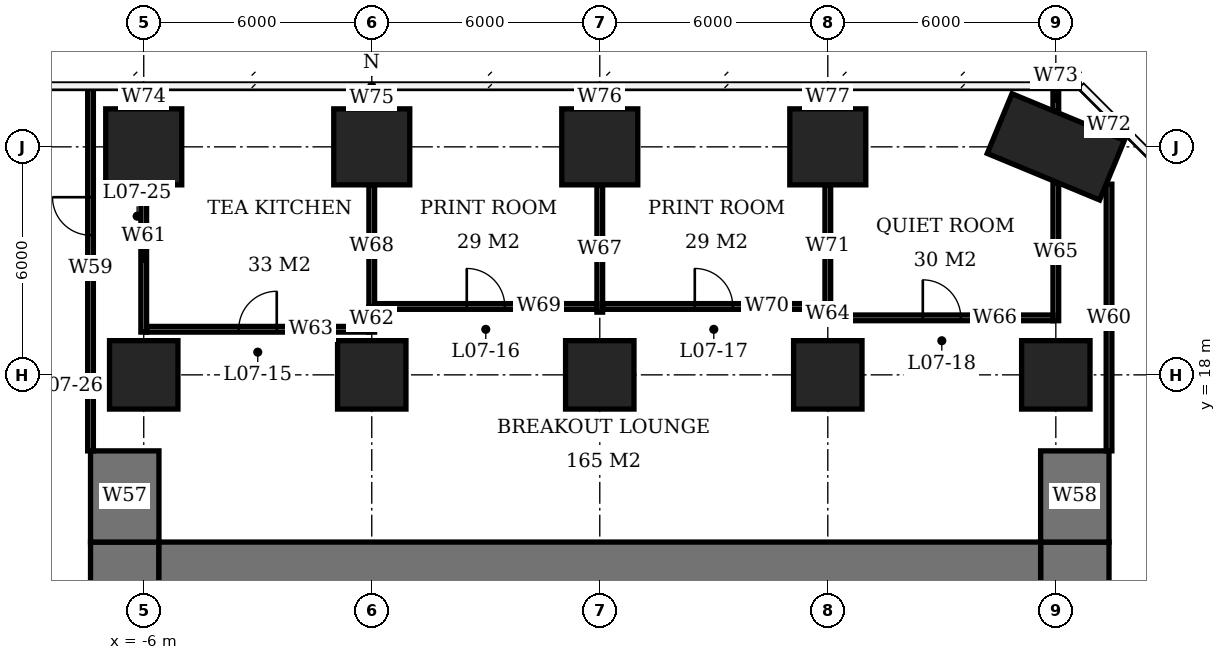
"""IFC4 building model, lengths in metres.
Left out: names, types, materials, properties, quantities, classifications, styles, units other than length and angle.
Written with IfcOpenShell. Run it as: python <this file> out.ifc"""

import sys

from ifc_helpers import new_model, si_unit, direction, frame, frame_2d, origin, origin_2d, place, context, subcontext, project, spatial, rectangle, extrude, element, fill, save


model = new_model("IFC4")
c1 = context("Model", 3, precision=1e-05, world=origin(), true_north=direction((0.0, 1.0)))
c2 = subcontext(c1, "Body", "Model", "MODEL_VIEW")
j1 = project(units=[si_unit("LENGTHUNIT", "METRE"), si_unit("PLANEANGLEUNIT", "RADIAN")], contexts=[c1])
p1 = place(None, origin())
s1 = spatial("IfcSite", under=j1, at=p1, CompositionType="ELEMENT")
p2 = place(p1, origin())
s2 = spatial("IfcBuilding", under=s1, at=p2, CompositionType="ELEMENT")
p3 = place(p2, frame((0.0, 0.0, 33.8)))
s3 = spatial("IfcBuildingStorey", under=s2, at=p3, CompositionType="ELEMENT", Elevation=33.8)
p4 = place(p3, frame((-6.0, 18.0, 0.0), z_axis=(0.0, 0.0, 1.0), x_axis=(1.0, 0.0, 0.0)))
e1 = element("IfcColumn", 1, at=p4, inside=s3, PredefinedType="COLUMN", context=c2, shape_type="SweptSolid", body=[
    extrude(rectangle(XDim=1.8, YDim=1.8, at=origin_2d()), origin(), (0.0, 0.0, 1.0), 3.9),
])
p5 = place(p3, frame((-6.0, 24.0, 0.0), z_axis=(0.0, 0.0, 1.0), x_axis=(1.0, 0.0, 0.0)))
e2 = element("IfcColumn", 2, at=p5, inside=s3, PredefinedType="COLUMN", context=c2, shape_type="SweptSolid", body=[
    extrude(rectangle(XDim=2.0, YDim=2.0, at=origin_2d()), origin(), (0.0, 0.0, 1.0), 3.9),
])
p6 = place(p3, frame((0.0, 18.0, 0.0), z_axis=(0.0, 0.0, 1.0), x_axis=(1.0, 0.0, 0.0)))
e3 = element("IfcColumn", 3, at=p6, inside=s3, PredefinedType="COLUMN", context=c2, shape_type="SweptSolid", body=[
    extrude(rectangle(XDim=1.8, YDim=1.8, at=origin_2d()), origin(), (0.0, 0.0, 1.0), 3.9),
])
p7 = place(p3, frame((0.0, 24.0, 0.0), z_axis=(0.0, 0.0, 1.0), x_axis=(1.0, 0.0, 0.0)))
e4 = element("IfcColumn", 4, at=p7, inside=s3, PredefinedType="COLUMN", context=c2, shape_type="SweptSolid", body=[
    extrude(rectangle(XDim=2.0, YDim=2.0, at=origin_2d()), origin(), (0.0, 0.0, 1.0), 3.9),
])
p8 = place(p3, frame((6.0, 18.0, 0.0), z_axis=(0.0, 0.0, 1.0), x_axis=(1.0, 0.0, 0.0)))
e5 = element("IfcColumn", 5, at=p8, inside=s3, PredefinedType="COLUMN", context=c2, shape_type="SweptSolid", body=[
    extrude(rectangle(XDim=1.8, YDim=1.8, at=origin_2d()), origin(), (0.0, 0.0, 1.0), 3.9),
])
p9 = place(p3, frame((6.0, 24.0, 0.0), z_axis=(0.0, 0.0, 1.0), x_axis=(1.0, 0.0, 0.0)))
e6 = element("IfcColumn", 6, at=p9, inside=s3, PredefinedType="COLUMN", context=c2, shape_type="SweptSolid", body=[
    extrude(rectangle(XDim=2.0, YDim=2.0, at=origin_2d()), origin(), (0.0, 0.0, 1.0), 3.9),
])
p10 = place(p3, frame((12.0, 18.0, 0.0), z_axis=(0.0, 0.0, 1.0), x_axis=(1.0, 0.0, 0.0)))
e7 = element("IfcColumn", 7, at=p10, inside=s3, PredefinedType="COLUMN", context=c2, shape_type="SweptSolid", body=[
    extrude(rectangle(XDim=1.8, YDim=1.8, at=origin_2d()), origin(), (0.0, 0.0, 1.0), 3.9),
])
p11 = place(p3, frame((12.0, 24.0, 0.0), z_axis=(0.0, 0.0, 1.0), x_axis=(1.0, 0.0, 0.0)))
e8 = element("IfcColumn", 8, at=p11, inside=s3, PredefinedType="COLUMN", context=c2, shape_type="SweptSolid", body=[
    extrude(rectangle(XDim=2.0, YDim=2.0, at=origin_2d()), origin(), (0.0, 0.0, 1.0), 3.9),
])
p12 = place(p3, frame((18.0, 18.0, 0.0), z_axis=(0.0, 0.0, 1.0), x_axis=(1.0, 0.0, 0.0)))
e9 = element("IfcColumn", 9, at=p12, inside=s3, PredefinedType="COLUMN", context=c2, shape_type="SweptSolid", body=[
    extrude(rectangle(XDim=1.8, YDim=1.8, at=origin_2d()), origin(), (0.0, 0.0, 1.0), 3.9),
])
p13 = place(p3, frame((18.0, 24.0, 0.0), z_axis=(0.0, 0.0, 1.0), x_axis=(0.923879532511, -0.382683432365, 0.0)))
e10 = element("IfcColumn", 10, at=p13, inside=s3, PredefinedType="COLUMN", context=c2, shape_type="SweptSolid", body=[
    extrude(rectangle(XDim=3.2, YDim=1.7, at=origin_2d()), origin(), (0.0, 0.0, 1.0), 3.9),
])
p14 = place(p3, frame((-5.6, 12.6, 0.0), z_axis=(0.0, 0.0, 1.0), x_axis=(1.0, 0.0, 0.0)))
e11 = element("IfcWall", 11, at=p14, inside=s3, PredefinedType="SHEAR", context=c2, shape_type="SweptSolid", body=[
    extrude(rectangle(XDim=23.2, YDim=2.0, at=frame_2d((11.6, 0.0))), origin(), (0.0, 0.0, 1.0), 3.9),
])
p15 = place(p3, frame((-6.5, -7.6, 0.0), z_axis=(0.0, 0.0, 1.0), x_axis=(0.0, 1.0, 0.0)))
e12 = element("IfcWall", 12, at=p15, inside=s3, PredefinedType="SHEAR", context=c2, shape_type="SweptSolid", body=[
    extrude(rectangle(XDim=21.2, YDim=1.8, at=frame_2d((10.6, 0.0))), origin(), (0.0, 0.0, 1.0), 3.9),
])
p16 = place(p15, frame((7.8, 0.0, 0.0)))
e13 = element("IfcOpeningElement", 13, at=p16, cuts=e12, PredefinedType="OPENING", context=c2, shape_type="SweptSolid", body=[
    extrude(rectangle(XDim=1.8, YDim=2.4, at=frame_2d((0.9, 1.2))), frame((0.0, 0.91, 0.0), z_axis=(0.0, -1.0, 0.0), x_axis=(1.0, 0.0, 0.0)), (0.0, 0.0, 1.0), 1.82),
])
p17 = place(p3, frame((18.5, -7.6, 0.0), z_axis=(0.0, 0.0, 1.0), x_axis=(0.0, 1.0, 0.0)))
e14 = element("IfcWall", 14, at=p17, inside=s3, PredefinedType="SHEAR", context=c2, shape_type="SweptSolid", body=[
    extrude(rectangle(XDim=21.2, YDim=1.8, at=frame_2d((10.6, 0.0))), origin(), (0.0, 0.0, 1.0), 3.9),
])
p18 = place(p17, frame((9.2, 0.0, 0.0)))
e15 = element("IfcOpeningElement", 15, at=p18, cuts=e14, PredefinedType="OPENING", context=c2, shape_type="SweptSolid", body=[
    extrude(rectangle(XDim=1.8, YDim=2.4, at=frame_2d((0.9, 1.2))), frame((0.0, 0.91, 0.0), z_axis=(0.0, -1.0, 0.0), x_axis=(1.0, 0.0, 0.0)), (0.0, 0.0, 1.0), 1.82),
])
for number, where, z_axis, x_axis in (
    (16, (-6.5, 13.6, 0.0), (0.0, 0.0, 1.0), (0.0, 1.0, 0.0)),
    (17, (18.5, 13.6, 0.0), (0.0, 0.0, 1.0), (0.0, 1.0, 0.0)),
):
    element("IfcWall", number, at=place(p3, frame(where, z_axis=z_axis, x_axis=x_axis)), inside=s3, PredefinedType="SHEAR", context=c2, shape_type="SweptSolid", body=[
        extrude(rectangle(XDim=2.4, YDim=1.8, at=frame_2d((1.2, 0.0))), origin(), (0.0, 0.0, 1.0), 3.9),
    ])
p19 = place(p3, frame((-5.925, 19.2, 0.0), z_axis=(0.0, 0.0, 1.0), x_axis=(1.0, 0.0, 0.0)))
e18 = element("IfcWall", 18, at=p19, inside=s3, PredefinedType="PARTITIONING", context=c2, shape_type="SweptSolid", body=[
    extrude(rectangle(XDim=5.85, YDim=0.15, at=frame_2d((2.925, 0.0))), origin(), (0.0, 0.0, 1.0), 3.65),
])
p20 = place(p19, frame((2.425, 0.0, 0.0)))
e19 = element("IfcOpeningElement", 19, at=p20, cuts=e18, PredefinedType="OPENING", context=c2, shape_type="SweptSolid", body=[
    extrude(rectangle(XDim=1.0, YDim=2.1, at=frame_2d((0.5, 1.05))), frame((0.0, 0.085, 0.0), z_axis=(0.0, -1.0, 0.0), x_axis=(1.0, 0.0, 0.0)), (0.0, 0.0, 1.0), 0.17),
])
p21 = place(p3, frame((12.075, 19.5, 0.0), z_axis=(0.0, 0.0, 1.0), x_axis=(1.0, 0.0, 0.0)))
e20 = element("IfcWall", 20, at=p21, inside=s3, PredefinedType="PARTITIONING", context=c2, shape_type="SweptSolid", body=[
    extrude(rectangle(XDim=5.85, YDim=0.15, at=frame_2d((2.925, 0.0))), origin(), (0.0, 0.0, 1.0), 3.65),
])
p22 = place(p21, frame((2.425, 0.0, 0.0)))
e21 = element("IfcOpeningElement", 21, at=p22, cuts=e20, PredefinedType="OPENING", context=c2, shape_type="SweptSolid", body=[
    extrude(rectangle(XDim=1.0, YDim=2.1, at=frame_2d((0.5, 1.05))), frame((0.0, 0.085, 0.0), z_axis=(0.0, -1.0, 0.0), x_axis=(1.0, 0.0, 0.0)), (0.0, 0.0, 1.0), 0.17),
])
p23 = place(p3, frame((0.075, 19.8, 0.0), z_axis=(0.0, 0.0, 1.0), x_axis=(1.0, 0.0, 0.0)))
e22 = element("IfcWall", 22, at=p23, inside=s3, PredefinedType="PARTITIONING", context=c2, shape_type="SweptSolid", body=[
    extrude(rectangle(XDim=5.85, YDim=0.15, at=frame_2d((2.925, 0.0))), origin(), (0.0, 0.0, 1.0), 3.65),
])
p24 = place(p23, frame((2.425, 0.0, 0.0)))
e23 = element("IfcOpeningElement", 23, at=p24, cuts=e22, PredefinedType="OPENING", context=c2, shape_type="SweptSolid", body=[
    extrude(rectangle(XDim=1.0, YDim=2.1, at=frame_2d((0.5, 1.05))), frame((0.0, 0.085, 0.0), z_axis=(0.0, -1.0, 0.0), x_axis=(1.0, 0.0, 0.0)), (0.0, 0.0, 1.0), 0.17),
])
p25 = place(p3, frame((6.075, 19.8, 0.0), z_axis=(0.0, 0.0, 1.0), x_axis=(1.0, 0.0, 0.0)))
e24 = element("IfcWall", 24, at=p25, inside=s3, PredefinedType="PARTITIONING", context=c2, shape_type="SweptSolid", body=[
    extrude(rectangle(XDim=5.85, YDim=0.15, at=frame_2d((2.925, 0.0))), origin(), (0.0, 0.0, 1.0), 3.65),
])
p26 = place(p25, frame((2.425, 0.0, 0.0)))
e25 = element("IfcOpeningElement", 25, at=p26, cuts=e24, PredefinedType="OPENING", context=c2, shape_type="SweptSolid", body=[
    extrude(rectangle(XDim=1.0, YDim=2.1, at=frame_2d((0.5, 1.05))), frame((0.0, 0.085, 0.0), z_axis=(0.0, -1.0, 0.0), x_axis=(1.0, 0.0, 0.0)), (0.0, 0.0, 1.0), 0.17),
])
p27 = place(p3, frame((-6.0, 19.125, 0.0), z_axis=(0.0, 0.0, 1.0), x_axis=(0.0, 1.0, 0.0)))
e26 = element("IfcWall", 26, at=p27, inside=s3, PredefinedType="PARTITIONING", context=c2, shape_type="SweptSolid", body=[
    extrude(rectangle(XDim=3.875, YDim=0.15, at=frame_2d((1.938, 0.0))), origin(), (0.0, 0.0, 1.0), 3.65),
])
p28 = place(p3, frame((-6.0, 25.0, 0.0), z_axis=(0.0, 0.0, 1.0), x_axis=(0.0, 1.0, 0.0)))
e27 = element("IfcWall", 27, at=p28, inside=s3, PredefinedType="PARTITIONING", context=c2, shape_type="SweptSolid", body=[
    extrude(rectangle(XDim=0.6, YDim=0.15, at=frame_2d((0.3, 0.0))), origin(), (0.0, 0.0, 1.0), 3.65),
])
p29 = place(p3, frame((0.0, 19.125, 0.0), z_axis=(0.0, 0.0, 1.0), x_axis=(0.0, 1.0, 0.0)))
e28 = element("IfcWall", 28, at=p29, inside=s3, PredefinedType="PARTITIONING", context=c2, shape_type="SweptSolid", body=[
    extrude(rectangle(XDim=0.675, YDim=0.15, at=frame_2d((0.337, 0.0))), origin(), (0.0, 0.0, 1.0), 3.65),
])
p30 = place(p3, frame((0.0, 19.8, 0.0), z_axis=(0.0, 0.0, 1.0), x_axis=(0.0, 1.0, 0.0)))
e29 = element("IfcWall", 29, at=p30, inside=s3, PredefinedType="PARTITIONING", context=c2, shape_type="SweptSolid", body=[
    extrude(rectangle(XDim=3.2, YDim=0.15, at=frame_2d((1.6, 0.0))), origin(), (0.0, 0.0, 1.0), 3.65),
])
p31 = place(p3, frame((0.0, 25.0, 0.0), z_axis=(0.0, 0.0, 1.0), x_axis=(0.0, 1.0, 0.0)))
e30 = element("IfcWall", 30, at=p31, inside=s3, PredefinedType="PARTITIONING", context=c2, shape_type="SweptSolid", body=[
    extrude(rectangle(XDim=0.55, YDim=0.15, at=frame_2d((0.275, 0.0))), origin(), (0.0, 0.0, 1.0), 3.65),
])
p32 = place(p3, frame((6.0, 19.65, 0.0), z_axis=(0.0, 0.0, 1.0), x_axis=(0.0, 1.0, 0.0)))
e31 = element("IfcWall", 31, at=p32, inside=s3, PredefinedType="PARTITIONING", context=c2, shape_type="SweptSolid", body=[
    extrude(rectangle(XDim=3.35, YDim=0.15, at=frame_2d((1.675, 0.0))), origin(), (0.0, 0.0, 1.0), 3.65),
])
p33 = place(p3, frame((6.0, 25.0, 0.0), z_axis=(0.0, 0.0, 1.0), x_axis=(0.0, 1.0, 0.0)))
e32 = element("IfcWall", 32, at=p33, inside=s3, PredefinedType="PARTITIONING", context=c2, shape_type="SweptSolid", body=[
    extrude(rectangle(XDim=0.6, YDim=0.15, at=frame_2d((0.3, 0.0))), origin(), (0.0, 0.0, 1.0), 3.65),
])
p34 = place(p3, frame((12.0, 19.425, 0.0), z_axis=(0.0, 0.0, 1.0), x_axis=(0.0, 1.0, 0.0)))
e33 = element("IfcWall", 33, at=p34, inside=s3, PredefinedType="PARTITIONING", context=c2, shape_type="SweptSolid", body=[
    extrude(rectangle(XDim=0.375, YDim=0.15, at=frame_2d((0.188, 0.0))), origin(), (0.0, 0.0, 1.0), 3.65),
])
p35 = place(p3, frame((12.0, 19.8, 0.0), z_axis=(0.0, 0.0, 1.0), x_axis=(0.0, 1.0, 0.0)))
e34 = element("IfcWall", 34, at=p35, inside=s3, PredefinedType="PARTITIONING", context=c2, shape_type="SweptSolid", body=[
    extrude(rectangle(XDim=3.2, YDim=0.15, at=frame_2d((1.6, 0.0))), origin(), (0.0, 0.0, 1.0), 3.65),
])
p36 = place(p3, frame((12.0, 25.0, 0.0), z_axis=(0.0, 0.0, 1.0), x_axis=(0.0, 1.0, 0.0)))
e35 = element("IfcWall", 35, at=p36, inside=s3, PredefinedType="PARTITIONING", context=c2, shape_type="SweptSolid", body=[
    extrude(rectangle(XDim=0.6, YDim=0.15, at=frame_2d((0.3, 0.0))), origin(), (0.0, 0.0, 1.0), 3.65),
])
p37 = place(p3, frame((18.0, 19.425, 0.0), z_axis=(0.0, 0.0, 1.0), x_axis=(0.0, 1.0, 0.0)))
e36 = element("IfcWall", 36, at=p37, inside=s3, PredefinedType="PARTITIONING", context=c2, shape_type="SweptSolid", body=[
    extrude(rectangle(XDim=3.624, YDim=0.15, at=frame_2d((1.812, 0.0))), origin(), (0.0, 0.0, 1.0), 3.65),
])
p38 = place(p3, frame((18.0, 24.951, 0.0), z_axis=(0.0, 0.0, 1.0), x_axis=(0.0, 1.0, 0.0)))
e37 = element("IfcWall", 37, at=p38, inside=s3, PredefinedType="PARTITIONING", context=c2, shape_type="SweptSolid", body=[
    extrude(rectangle(XDim=0.649, YDim=0.15, at=frame_2d((0.324, 0.0))), origin(), (0.0, 0.0, 1.0), 3.65),
])
p39 = place(p3, frame((-7.4, 16.0, 0.0), z_axis=(0.0, 0.0, 1.0), x_axis=(0.0, 1.0, 0.0)))
e38 = element("IfcWall", 38, at=p39, inside=s3, PredefinedType="PARTITIONING", context=c2, shape_type="SweptSolid", body=[
    extrude(rectangle(XDim=9.6, YDim=0.15, at=frame_2d((4.8, 0.0))), origin(), (0.0, 0.0, 1.0), 3.65),
])
p40 = place(p39, frame((5.675, 0.0, 0.0)))
e39 = element("IfcOpeningElement", 39, at=p40, cuts=e38, PredefinedType="OPENING", context=c2, shape_type="SweptSolid", body=[
    extrude(rectangle(XDim=1.0, YDim=2.1, at=frame_2d((0.5, 1.05))), frame((0.0, 0.085, 0.0), z_axis=(0.0, -1.0, 0.0), x_axis=(1.0, 0.0, 0.0)), (0.0, 0.0, 1.0), 0.17),
])
p41 = place(p3, frame((19.4, 16.0, 0.0), z_axis=(0.0, 0.0, 1.0), x_axis=(0.0, 1.0, 0.0)))
e40 = element("IfcWall", 40, at=p41, inside=s3, PredefinedType="PARTITIONING", context=c2, shape_type="SweptSolid", body=[
    extrude(rectangle(XDim=7.018, YDim=0.15, at=frame_2d((3.509, 0.0))), origin(), (0.0, 0.0, 1.0), 3.65),
])
p42 = place(p3, frame((19.4, 24.371, 0.0), z_axis=(0.0, 0.0, 1.0), x_axis=(0.0, 1.0, 0.0)))
e41 = element("IfcWall", 41, at=p42, inside=s3, PredefinedType="PARTITIONING", context=c2, shape_type="SweptSolid", body=[
    extrude(rectangle(XDim=0.4, YDim=0.15, at=frame_2d((0.2, 0.0))), origin(), (0.0, 0.0, 1.0), 3.65),
])
p43 = place(p20, origin())
e42 = element("IfcDoor", 42, at=p43, inside=s3, OperationType="SINGLE_SWING_RIGHT", PredefinedType="DOOR", context=c2, shape_type="SweptSolid", body=[
    extrude(rectangle(XDim=1.0, YDim=2.1, at=frame_2d((0.5, 1.05))), frame((0.0, 0.025, 0.0), z_axis=(0.0, -1.0, 0.0), x_axis=(1.0, 0.0, 0.0)), (0.0, 0.0, 1.0), 0.05),
])
fill(e19, e42)
p44 = place(p24, origin())
e43 = element("IfcDoor", 43, at=p44, inside=s3, OperationType="SINGLE_SWING_LEFT", PredefinedType="DOOR", context=c2, shape_type="SweptSolid", body=[
    extrude(rectangle(XDim=1.0, YDim=2.1, at=frame_2d((0.5, 1.05))), frame((0.0, 0.025, 0.0), z_axis=(0.0, -1.0, 0.0), x_axis=(1.0, 0.0, 0.0)), (0.0, 0.0, 1.0), 0.05),
])
fill(e23, e43)
p45 = place(p26, origin())
e44 = element("IfcDoor", 44, at=p45, inside=s3, OperationType="SINGLE_SWING_LEFT", PredefinedType="DOOR", context=c2, shape_type="SweptSolid", body=[
    extrude(rectangle(XDim=1.0, YDim=2.1, at=frame_2d((0.5, 1.05))), frame((0.0, 0.025, 0.0), z_axis=(0.0, -1.0, 0.0), x_axis=(1.0, 0.0, 0.0)), (0.0, 0.0, 1.0), 0.05),
])
fill(e25, e44)
p46 = place(p22, origin())
e45 = element("IfcDoor", 45, at=p46, inside=s3, OperationType="SINGLE_SWING_LEFT", PredefinedType="DOOR", context=c2, shape_type="SweptSolid", body=[
    extrude(rectangle(XDim=1.0, YDim=2.1, at=frame_2d((0.5, 1.05))), frame((0.0, 0.025, 0.0), z_axis=(0.0, -1.0, 0.0), x_axis=(1.0, 0.0, 0.0)), (0.0, 0.0, 1.0), 0.05),
])
fill(e21, e45)
p47 = place(p40, origin())
e46 = element("IfcDoor", 46, at=p47, inside=s3, OperationType="SINGLE_SWING_RIGHT", PredefinedType="DOOR", context=c2, shape_type="SweptSolid", body=[
    extrude(rectangle(XDim=1.0, YDim=2.1, at=frame_2d((0.5, 1.05))), frame((0.0, 0.025, 0.0), z_axis=(0.0, -1.0, 0.0), x_axis=(1.0, 0.0, 0.0)), (0.0, 0.0, 1.0), 0.05),
])
fill(e39, e46)
save(model, sys.argv[1])
